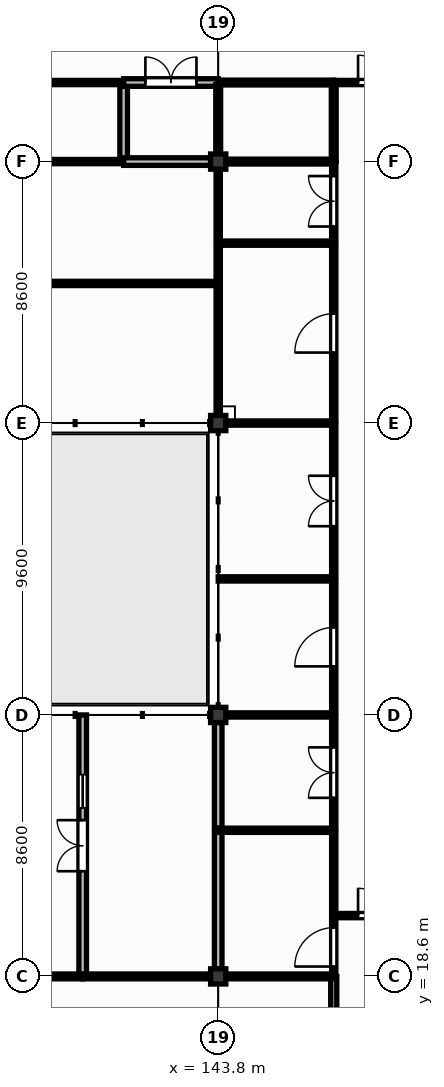
"""IFC4 building model, lengths in metres.
Left out: names, types, materials, properties, quantities, classifications, styles, units other than length and angle.
Written with IfcOpenShell. Run it as: python <this file> out.ifc"""

import sys

from ifc_helpers import new_model, si_unit, direction, frame, frame_2d, origin, origin_2d, place, context, subcontext, project, spatial, rectangle, extrude, element, fill, save


model = new_model("IFC4")
c1 = context("Model", 3, precision=1e-05, world=origin(), true_north=direction((0.0, 1.0)))
c2 = subcontext(c1, "Body", "Model", "MODEL_VIEW")
j1 = project(units=[si_unit("LENGTHUNIT", "METRE"), si_unit("PLANEANGLEUNIT", "RADIAN")], contexts=[c1])
p1 = place(None, origin())
s1 = spatial("IfcSite", under=j1, at=p1, CompositionType="ELEMENT")
p2 = place(p1, origin())
s2 = spatial("IfcBuilding", under=s1, at=p2, CompositionType="ELEMENT")
p3 = place(p2, frame((0.0, 0.0, 4.5)))
s3 = spatial("IfcBuildingStorey", under=s2, at=p3, CompositionType="ELEMENT", Elevation=4.5)
for number, where, z_axis, x_axis in (
    (1, (143.8, 18.6, 0.0), (0.0, 0.0, 1.0), (1.0, 0.0, 0.0)),
    (2, (143.8, 27.2, 0.0), (0.0, 0.0, 1.0), (1.0, 0.0, 0.0)),
    (3, (143.8, 36.8, 0.0), (0.0, 0.0, 1.0), (1.0, 0.0, 0.0)),
    (4, (143.8, 45.4, 0.0), (0.0, 0.0, 1.0), (1.0, 0.0, 0.0)),
):
    element("IfcColumn", number, at=place(p3, frame(where, z_axis=z_axis, x_axis=x_axis)), inside=s3, PredefinedType="COLUMN", context=c2, shape_type="SweptSolid", body=[
        extrude(rectangle(XDim=0.5, YDim=0.5, at=origin_2d()), origin(), (0.0, 0.0, 1.0), 4.22),
    ])
p4 = place(p3, frame((136.6, 41.392, 0.0), z_axis=(0.0, 0.0, 1.0), x_axis=(1.0, 0.0, 0.0)))
e5 = element("IfcWall", 5, at=p4, inside=s3, PredefinedType="PARTITIONING", context=c2, shape_type="SweptSolid", body=[
    extrude(rectangle(XDim=7.2, YDim=0.14, at=frame_2d((3.6, 0.0))), origin(), (0.0, 0.0, 1.0), 4.18),
])
p5 = place(p3, frame((136.85, 45.4, 0.0), z_axis=(0.0, 0.0, 1.0), x_axis=(1.0, 0.0, 0.0)))
e6 = element("IfcWall", 6, at=p5, inside=s3, PredefinedType="PARTITIONING", context=c2, shape_type="SweptSolid", body=[
    extrude(rectangle(XDim=3.84, YDim=0.14, at=frame_2d((1.92, 0.0))), origin(), (0.0, 0.0, 1.0), 3.52),
])
p6 = place(p3, frame((136.6, 48.0, 0.0), z_axis=(0.0, 0.0, 1.0), x_axis=(1.0, 0.0, 0.0)))
e7 = element("IfcWall", 7, at=p6, inside=s3, PredefinedType="PARTITIONING", context=c2, shape_type="SweptSolid", body=[
    extrude(rectangle(XDim=4.09, YDim=0.14, at=frame_2d((2.045, 0.0))), origin(), (0.0, 0.0, 1.0), 4.18),
])
p7 = place(p3, frame((139.343, 18.6, 0.0), z_axis=(0.0, 0.0, 1.0), x_axis=(0.0, 1.0, 0.0)))
e8 = element("IfcWall", 8, at=p7, inside=s3, PredefinedType="SOLIDWALL", context=c2, shape_type="SweptSolid", body=[
    extrude(rectangle(XDim=8.6, YDim=0.25, at=frame_2d((4.3, 0.0))), origin(), (0.0, 0.0, 1.0), 4.18),
])
p8 = place(p7, frame((3.46, 0.0, 0.0)))
e9 = element("IfcOpeningElement", 9, at=p8, cuts=e8, PredefinedType="OPENING", context=c2, shape_type="SweptSolid", body=[
    extrude(rectangle(XDim=1.68, YDim=2.3, at=frame_2d((0.84, 1.15))), frame((0.0, 0.135, 0.0), z_axis=(0.0, -1.0, 0.0), x_axis=(1.0, 0.0, 0.0)), (0.0, 0.0, 1.0), 0.27),
])
p9 = place(p7, frame((5.54, 0.0, 1.1)))
e10 = element("IfcOpeningElement", 10, at=p9, cuts=e8, PredefinedType="OPENING", context=c2, shape_type="SweptSolid", body=[
    extrude(rectangle(XDim=1.1, YDim=1.05, at=frame_2d((0.55, 0.525))), frame((0.0, 0.135, 0.0), z_axis=(0.0, -1.0, 0.0), x_axis=(1.0, 0.0, 0.0)), (0.0, 0.0, 1.0), 0.27),
])
p10 = place(p3, frame((140.69, 45.47, 0.0), z_axis=(0.0, 0.0, 1.0), x_axis=(0.0, 1.0, 0.0)))
e11 = element("IfcWall", 11, at=p10, inside=s3, PredefinedType="SOLIDWALL", context=c2, shape_type="SweptSolid", body=[
    extrude(rectangle(XDim=2.46, YDim=0.25, at=frame_2d((1.23, 0.0))), origin(), (0.0, 0.0, 1.0), 4.18),
])
p11 = place(p3, frame((140.69, 45.4, 0.0), z_axis=(0.0, 0.0, 1.0), x_axis=(1.0, 0.0, 0.0)))
e12 = element("IfcWall", 12, at=p11, inside=s3, PredefinedType="SOLIDWALL", context=c2, shape_type="SweptSolid", body=[
    extrude(rectangle(XDim=2.86, YDim=0.25, at=frame_2d((1.43, 0.0))), origin(), (0.0, 0.0, 1.0), 3.52),
])
p12 = place(p3, frame((140.69, 48.0, 0.0), z_axis=(0.0, 0.0, 1.0), x_axis=(1.0, 0.0, 0.0)))
e13 = element("IfcWall", 13, at=p12, inside=s3, PredefinedType="SOLIDWALL", context=c2, shape_type="SweptSolid", body=[
    extrude(rectangle(XDim=3.11, YDim=0.25, at=frame_2d((1.555, 0.0))), origin(), (0.0, 0.0, 1.0), 4.18),
])
p13 = place(p12, frame((0.715, 0.0, 0.0)))
e14 = element("IfcOpeningElement", 14, at=p13, cuts=e13, PredefinedType="OPENING", context=c2, shape_type="SweptSolid", body=[
    extrude(rectangle(XDim=1.68, YDim=2.3, at=frame_2d((0.84, 1.15))), frame((0.0, 0.135, 0.0), z_axis=(0.0, -1.0, 0.0), x_axis=(1.0, 0.0, 0.0)), (0.0, 0.0, 1.0), 0.27),
])
p14 = place(p3, frame((143.8, 18.85, 0.0), z_axis=(0.0, 0.0, 1.0), x_axis=(0.0, 1.0, 0.0)))
e15 = element("IfcWall", 15, at=p14, inside=s3, PredefinedType="SOLIDWALL", context=c2, shape_type="SweptSolid", body=[
    extrude(rectangle(XDim=4.487, YDim=0.25, at=frame_2d((2.243, 0.0))), origin(), (0.0, 0.0, 1.0), 3.52),
])
p15 = place(p3, frame((143.8, 23.477, 0.0), z_axis=(0.0, 0.0, 1.0), x_axis=(0.0, 1.0, 0.0)))
e16 = element("IfcWall", 16, at=p15, inside=s3, PredefinedType="SOLIDWALL", context=c2, shape_type="SweptSolid", body=[
    extrude(rectangle(XDim=3.473, YDim=0.25, at=frame_2d((1.736, 0.0))), origin(), (0.0, 0.0, 1.0), 3.52),
])
p16 = place(p3, frame((143.8, 23.407, 0.0), z_axis=(0.0, 0.0, 1.0), x_axis=(1.0, 0.0, 0.0)))
e17 = element("IfcWall", 17, at=p16, inside=s3, PredefinedType="PARTITIONING", context=c2, shape_type="SweptSolid", body=[
    extrude(rectangle(XDim=3.8, YDim=0.14, at=frame_2d((1.9, 0.0))), origin(), (0.0, 0.0, 1.0), 4.18),
])
p17 = place(p3, frame((144.05, 27.2, 0.0), z_axis=(0.0, 0.0, 1.0), x_axis=(1.0, 0.0, 0.0)))
e18 = element("IfcWall", 18, at=p17, inside=s3, PredefinedType="PARTITIONING", context=c2, shape_type="SweptSolid", body=[
    extrude(rectangle(XDim=3.55, YDim=0.14, at=frame_2d((1.775, 0.0))), origin(), (0.0, 0.0, 1.0), 3.62),
])
p18 = place(p3, frame((143.8, 31.674, 0.0), z_axis=(0.0, 0.0, 1.0), x_axis=(1.0, 0.0, 0.0)))
e19 = element("IfcWall", 19, at=p18, inside=s3, PredefinedType="PARTITIONING", context=c2, shape_type="SweptSolid", body=[
    extrude(rectangle(XDim=3.8, YDim=0.14, at=frame_2d((1.9, 0.0))), origin(), (0.0, 0.0, 1.0), 4.18),
])
p19 = place(p3, frame((143.8, 37.05, 0.0), z_axis=(0.0, 0.0, 1.0), x_axis=(0.0, 1.0, 0.0)))
e20 = element("IfcWall", 20, at=p19, inside=s3, PredefinedType="PARTITIONING", context=c2, shape_type="SweptSolid", body=[
    extrude(rectangle(XDim=4.272, YDim=0.14, at=frame_2d((2.136, 0.0))), origin(), (0.0, 0.0, 1.0), 3.52),
])
p20 = place(p3, frame((144.05, 36.8, 0.0), z_axis=(0.0, 0.0, 1.0), x_axis=(1.0, 0.0, 0.0)))
e21 = element("IfcWall", 21, at=p20, inside=s3, PredefinedType="PARTITIONING", context=c2, shape_type="SweptSolid", body=[
    extrude(rectangle(XDim=3.55, YDim=0.14, at=frame_2d((1.775, 0.0))), origin(), (0.0, 0.0, 1.0), 3.58),
])
p21 = place(p3, frame((143.8, 41.462, 0.0), z_axis=(0.0, 0.0, 1.0), x_axis=(0.0, 1.0, 0.0)))
e22 = element("IfcWall", 22, at=p21, inside=s3, PredefinedType="PARTITIONING", context=c2, shape_type="SweptSolid", body=[
    extrude(rectangle(XDim=1.185, YDim=0.14, at=frame_2d((0.593, 0.0))), origin(), (0.0, 0.0, 1.0), 3.52),
])
p22 = place(p3, frame((143.8, 42.787, 0.0), z_axis=(0.0, 0.0, 1.0), x_axis=(0.0, 1.0, 0.0)))
e23 = element("IfcWall", 23, at=p22, inside=s3, PredefinedType="PARTITIONING", context=c2, shape_type="SweptSolid", body=[
    extrude(rectangle(XDim=2.363, YDim=0.14, at=frame_2d((1.181, 0.0))), origin(), (0.0, 0.0, 1.0), 3.52),
])
p23 = place(p3, frame((143.8, 42.717, 0.0), z_axis=(0.0, 0.0, 1.0), x_axis=(1.0, 0.0, 0.0)))
e24 = element("IfcWall", 24, at=p23, inside=s3, PredefinedType="PARTITIONING", context=c2, shape_type="SweptSolid", body=[
    extrude(rectangle(XDim=3.8, YDim=0.14, at=frame_2d((1.9, 0.0))), origin(), (0.0, 0.0, 1.0), 4.18),
])
p24 = place(p3, frame((147.6, 18.6, 0.0), z_axis=(0.0, 0.0, 1.0), x_axis=(0.0, 1.0, 0.0)))
e25 = element("IfcWall", 25, at=p24, inside=s3, PredefinedType="PARTITIONING", context=c2, shape_type="SweptSolid", body=[
    extrude(rectangle(XDim=1.93, YDim=0.14, at=frame_2d((0.965, 0.0))), origin(), (0.0, 0.0, 1.0), 4.18),
])
p25 = place(p24, frame((0.325, 0.0, 0.0)))
e26 = element("IfcOpeningElement", 26, at=p25, cuts=e25, PredefinedType="OPENING", context=c2, shape_type="SweptSolid", body=[
    extrude(rectangle(XDim=1.28, YDim=2.2, at=frame_2d((0.64, 1.1))), frame((0.0, 0.08, 0.0), z_axis=(0.0, -1.0, 0.0), x_axis=(1.0, 0.0, 0.0)), (0.0, 0.0, 1.0), 0.16),
])
p26 = place(p3, frame((147.6, 20.67, 0.0), z_axis=(0.0, 0.0, 1.0), x_axis=(0.0, 1.0, 0.0)))
e27 = element("IfcWall", 27, at=p26, inside=s3, PredefinedType="PARTITIONING", context=c2, shape_type="SweptSolid", body=[
    extrude(rectangle(XDim=2.667, YDim=0.14, at=frame_2d((1.333, 0.0))), origin(), (0.0, 0.0, 1.0), 4.18),
])
p27 = place(p3, frame((147.6, 20.6, 0.0), z_axis=(0.0, 0.0, 1.0), x_axis=(1.0, 0.0, 0.0)))
e28 = element("IfcWall", 28, at=p27, inside=s3, PredefinedType="PARTITIONING", context=c2, shape_type="SweptSolid", body=[
    extrude(rectangle(XDim=3.4, YDim=0.14, at=frame_2d((1.7, 0.0))), origin(), (0.0, 0.0, 1.0), 4.18),
])
p28 = place(p27, frame((0.8, 0.0, 0.0)))
e29 = element("IfcOpeningElement", 29, at=p28, cuts=e28, PredefinedType="OPENING", context=c2, shape_type="SweptSolid", body=[
    extrude(rectangle(XDim=1.8, YDim=2.3, at=frame_2d((0.9, 1.15))), frame((0.0, 0.08, 0.0), z_axis=(0.0, -1.0, 0.0), x_axis=(1.0, 0.0, 0.0)), (0.0, 0.0, 1.0), 0.16),
])
p29 = place(p3, frame((147.6, 23.477, 0.0), z_axis=(0.0, 0.0, 1.0), x_axis=(0.0, 1.0, 0.0)))
e30 = element("IfcWall", 30, at=p29, inside=s3, PredefinedType="PARTITIONING", context=c2, shape_type="SweptSolid", body=[
    extrude(rectangle(XDim=3.653, YDim=0.14, at=frame_2d((1.826, 0.0))), origin(), (0.0, 0.0, 1.0), 4.18),
])
p30 = place(p29, frame((0.997, 0.0, 0.0)))
e31 = element("IfcOpeningElement", 31, at=p30, cuts=e30, PredefinedType="OPENING", context=c2, shape_type="SweptSolid", body=[
    extrude(rectangle(XDim=1.66, YDim=2.3, at=frame_2d((0.83, 1.15))), frame((0.0, 0.08, 0.0), z_axis=(0.0, -1.0, 0.0), x_axis=(1.0, 0.0, 0.0)), (0.0, 0.0, 1.0), 0.16),
])
p31 = place(p3, frame((147.6, 27.27, 0.0), z_axis=(0.0, 0.0, 1.0), x_axis=(0.0, 1.0, 0.0)))
e32 = element("IfcWall", 32, at=p31, inside=s3, PredefinedType="PARTITIONING", context=c2, shape_type="SweptSolid", body=[
    extrude(rectangle(XDim=4.334, YDim=0.14, at=frame_2d((2.167, 0.0))), origin(), (0.0, 0.0, 1.0), 4.18),
])
p32 = place(p31, frame((1.527, 0.0, 0.0)))
e33 = element("IfcOpeningElement", 33, at=p32, cuts=e32, PredefinedType="OPENING", context=c2, shape_type="SweptSolid", body=[
    extrude(rectangle(XDim=1.28, YDim=2.2, at=frame_2d((0.64, 1.1))), frame((0.0, 0.08, 0.0), z_axis=(0.0, -1.0, 0.0), x_axis=(1.0, 0.0, 0.0)), (0.0, 0.0, 1.0), 0.16),
])
p33 = place(p3, frame((147.6, 31.744, 0.0), z_axis=(0.0, 0.0, 1.0), x_axis=(0.0, 1.0, 0.0)))
e34 = element("IfcWall", 34, at=p33, inside=s3, PredefinedType="PARTITIONING", context=c2, shape_type="SweptSolid", body=[
    extrude(rectangle(XDim=4.986, YDim=0.14, at=frame_2d((2.493, 0.0))), origin(), (0.0, 0.0, 1.0), 4.18),
])
p34 = place(p33, frame((1.663, 0.0, 0.0)))
e35 = element("IfcOpeningElement", 35, at=p34, cuts=e34, PredefinedType="OPENING", context=c2, shape_type="SweptSolid", body=[
    extrude(rectangle(XDim=1.66, YDim=2.3, at=frame_2d((0.83, 1.15))), frame((0.0, 0.08, 0.0), z_axis=(0.0, -1.0, 0.0), x_axis=(1.0, 0.0, 0.0)), (0.0, 0.0, 1.0), 0.16),
])
p35 = place(p3, frame((147.6, 36.87, 0.0), z_axis=(0.0, 0.0, 1.0), x_axis=(0.0, 1.0, 0.0)))
e36 = element("IfcWall", 36, at=p35, inside=s3, PredefinedType="PARTITIONING", context=c2, shape_type="SweptSolid", body=[
    extrude(rectangle(XDim=5.777, YDim=0.14, at=frame_2d((2.888, 0.0))), origin(), (0.0, 0.0, 1.0), 4.18),
])
p36 = place(p35, frame((2.249, 0.0, 0.0)))
e37 = element("IfcOpeningElement", 37, at=p36, cuts=e36, PredefinedType="OPENING", context=c2, shape_type="SweptSolid", body=[
    extrude(rectangle(XDim=1.28, YDim=2.2, at=frame_2d((0.64, 1.1))), frame((0.0, 0.08, 0.0), z_axis=(0.0, -1.0, 0.0), x_axis=(1.0, 0.0, 0.0)), (0.0, 0.0, 1.0), 0.16),
])
p37 = place(p3, frame((147.6, 42.787, 0.0), z_axis=(0.0, 0.0, 1.0), x_axis=(0.0, 1.0, 0.0)))
e38 = element("IfcWall", 38, at=p37, inside=s3, PredefinedType="PARTITIONING", context=c2, shape_type="SweptSolid", body=[
    extrude(rectangle(XDim=2.613, YDim=0.14, at=frame_2d((1.306, 0.0))), origin(), (0.0, 0.0, 1.0), 4.18),
])
p38 = place(p37, frame((0.477, 0.0, 0.0)))
e39 = element("IfcOpeningElement", 39, at=p38, cuts=e38, PredefinedType="OPENING", context=c2, shape_type="SweptSolid", body=[
    extrude(rectangle(XDim=1.66, YDim=2.3, at=frame_2d((0.83, 1.15))), frame((0.0, 0.08, 0.0), z_axis=(0.0, -1.0, 0.0), x_axis=(1.0, 0.0, 0.0)), (0.0, 0.0, 1.0), 0.16),
])
p39 = place(p3, frame((147.6, 48.0, 0.0), z_axis=(0.0, 0.0, 1.0), x_axis=(1.0, 0.0, 0.0)))
e40 = element("IfcWall", 40, at=p39, inside=s3, PredefinedType="PARTITIONING", context=c2, shape_type="SweptSolid", body=[
    extrude(rectangle(XDim=3.4, YDim=0.14, at=frame_2d((1.7, 0.0))), origin(), (0.0, 0.0, 1.0), 4.18),
])
p40 = place(p39, frame((0.8, 0.0, 0.0)))
e41 = element("IfcOpeningElement", 41, at=p40, cuts=e40, PredefinedType="OPENING", context=c2, shape_type="SweptSolid", body=[
    extrude(rectangle(XDim=1.8, YDim=2.3, at=frame_2d((0.9, 1.15))), frame((0.0, 0.08, 0.0), z_axis=(0.0, -1.0, 0.0), x_axis=(1.0, 0.0, 0.0)), (0.0, 0.0, 1.0), 0.16),
])
p41 = place(p3, frame((147.6, 16.4, 0.0), z_axis=(0.0, 0.0, 1.0), x_axis=(0.0, 1.0, 0.0)))
e42 = element("IfcWall", 42, at=p41, inside=s3, PredefinedType="PARTITIONING", context=c2, shape_type="SweptSolid", body=[
    extrude(rectangle(XDim=2.2, YDim=0.2, at=frame_2d((1.1, 0.0))), origin(), (0.0, 0.0, 1.0), 4.18),
])
p42 = place(p3, frame((147.6, 45.4, 0.0), z_axis=(0.0, 0.0, 1.0), x_axis=(0.0, 1.0, 0.0)))
e43 = element("IfcWall", 43, at=p42, inside=s3, PredefinedType="PARTITIONING", context=c2, shape_type="SweptSolid", body=[
    extrude(rectangle(XDim=2.53, YDim=0.16, at=frame_2d((1.265, 0.0))), origin(), (0.0, 0.0, 1.0), 4.18),
])
p43 = place(p3, frame((143.8, 48.0, 0.0), z_axis=(0.0, 0.0, 1.0), x_axis=(1.0, 0.0, 0.0)))
e44 = element("IfcWall", 44, at=p43, inside=s3, PredefinedType="PARTITIONING", context=c2, shape_type="SweptSolid", body=[
    extrude(rectangle(XDim=3.8, YDim=0.16, at=frame_2d((1.9, 0.0))), origin(), (0.0, 0.0, 1.0), 4.18),
])
p44 = place(p3, frame((136.85, 18.6, 0.0), z_axis=(0.0, 0.0, 1.0), x_axis=(1.0, 0.0, 0.0)))
e45 = element("IfcWall", 45, at=p44, inside=s3, PredefinedType="PARTITIONING", context=c2, shape_type="SweptSolid", body=[
    extrude(rectangle(XDim=2.493, YDim=0.16, at=frame_2d((1.247, 0.0))), origin(), (0.0, 0.0, 1.0), 3.52),
])
p45 = place(p3, frame((139.343, 18.6, 0.0), z_axis=(0.0, 0.0, 1.0), x_axis=(1.0, 0.0, 0.0)))
e46 = element("IfcWall", 46, at=p45, inside=s3, PredefinedType="PARTITIONING", context=c2, shape_type="SweptSolid", body=[
    extrude(rectangle(XDim=4.207, YDim=0.16, at=frame_2d((2.104, 0.0))), origin(), (0.0, 0.0, 1.0), 3.52),
])
p46 = place(p3, frame((143.8, 45.65, 0.0), z_axis=(0.0, 0.0, 1.0), x_axis=(0.0, 1.0, 0.0)))
e47 = element("IfcWall", 47, at=p46, inside=s3, PredefinedType="PARTITIONING", context=c2, shape_type="SweptSolid", body=[
    extrude(rectangle(XDim=2.28, YDim=0.16, at=frame_2d((1.14, 0.0))), origin(), (0.0, 0.0, 1.0), 3.52),
])
p47 = place(p3, frame((144.05, 18.6, 0.0), z_axis=(0.0, 0.0, 1.0), x_axis=(1.0, 0.0, 0.0)))
e48 = element("IfcWall", 48, at=p47, inside=s3, PredefinedType="PARTITIONING", context=c2, shape_type="SweptSolid", body=[
    extrude(rectangle(XDim=3.55, YDim=0.16, at=frame_2d((1.775, 0.0))), origin(), (0.0, 0.0, 1.0), 3.58),
])
p48 = place(p3, frame((147.6, 45.4, 0.0), z_axis=(0.0, 0.0, 1.0), x_axis=(-1.0, 0.0, 0.0)))
e49 = element("IfcWall", 49, at=p48, inside=s3, PredefinedType="PARTITIONING", context=c2, shape_type="SweptSolid", body=[
    extrude(rectangle(XDim=3.55, YDim=0.16, at=frame_2d((1.775, 0.0))), origin(), (0.0, 0.0, 1.0), 3.62),
])
p49 = place(p28, origin())
e50 = element("IfcDoor", 50, at=p49, inside=s3, OperationType="DOUBLE_DOOR_SINGLE_SWING", PredefinedType="DOOR", context=c2, shape_type="SweptSolid", body=[
    extrude(rectangle(XDim=1.8, YDim=2.3, at=frame_2d((0.9, 1.15))), frame((0.0, 0.025, 0.0), z_axis=(0.0, -1.0, 0.0), x_axis=(1.0, 0.0, 0.0)), (0.0, 0.0, 1.0), 0.05),
])
fill(e29, e50)
p50 = place(p40, origin())
e51 = element("IfcDoor", 51, at=p50, inside=s3, OperationType="DOUBLE_DOOR_SINGLE_SWING", PredefinedType="DOOR", context=c2, shape_type="SweptSolid", body=[
    extrude(rectangle(XDim=1.8, YDim=2.3, at=frame_2d((0.9, 1.15))), frame((0.0, 0.025, 0.0), z_axis=(0.0, -1.0, 0.0), x_axis=(1.0, 0.0, 0.0)), (0.0, 0.0, 1.0), 0.05),
])
fill(e41, e51)
p51 = place(p8, origin())
e52 = element("IfcDoor", 52, at=p51, inside=s3, OperationType="DOUBLE_DOOR_SINGLE_SWING", PredefinedType="DOOR", context=c2, shape_type="SweptSolid", body=[
    extrude(rectangle(XDim=1.68, YDim=2.3, at=frame_2d((0.84, 1.15))), frame((0.0, 0.025, 0.0), z_axis=(0.0, -1.0, 0.0), x_axis=(1.0, 0.0, 0.0)), (0.0, 0.0, 1.0), 0.05),
])
fill(e9, e52)
p52 = place(p9, origin())
e53 = element("IfcWindow", 53, at=p52, inside=s3, PartitioningType="SINGLE_PANEL", PredefinedType="WINDOW", context=c2, shape_type="SweptSolid", body=[
    extrude(rectangle(XDim=1.1, YDim=1.05, at=frame_2d((0.55, 0.525))), frame((0.0, 0.03, 0.0), z_axis=(0.0, -1.0, 0.0), x_axis=(1.0, 0.0, 0.0)), (0.0, 0.0, 1.0), 0.06),
])
fill(e10, e53)
p53 = place(p13, origin())
e54 = element("IfcDoor", 54, at=p53, inside=s3, OperationType="DOUBLE_DOOR_SINGLE_SWING", PredefinedType="DOOR", context=c2, shape_type="SweptSolid", body=[
    extrude(rectangle(XDim=1.68, YDim=2.3, at=frame_2d((0.84, 1.15))), frame((0.0, 0.025, 0.0), z_axis=(0.0, -1.0, 0.0), x_axis=(1.0, 0.0, 0.0)), (0.0, 0.0, 1.0), 0.05),
])
fill(e14, e54)
p54 = place(p25, origin())
e55 = element("IfcDoor", 55, at=p54, inside=s3, OperationType="SINGLE_SWING_LEFT", PredefinedType="DOOR", context=c2, shape_type="SweptSolid", body=[
    extrude(rectangle(XDim=1.28, YDim=2.2, at=frame_2d((0.64, 1.1))), frame((0.0, 0.025, 0.0), z_axis=(0.0, -1.0, 0.0), x_axis=(1.0, 0.0, 0.0)), (0.0, 0.0, 1.0), 0.05),
])
fill(e26, e55)
p55 = place(p30, origin())
e56 = element("IfcDoor", 56, at=p55, inside=s3, OperationType="DOUBLE_DOOR_SINGLE_SWING", PredefinedType="DOOR", context=c2, shape_type="SweptSolid", body=[
    extrude(rectangle(XDim=1.66, YDim=2.3, at=frame_2d((0.83, 1.15))), frame((0.0, 0.025, 0.0), z_axis=(0.0, -1.0, 0.0), x_axis=(1.0, 0.0, 0.0)), (0.0, 0.0, 1.0), 0.05),
])
fill(e31, e56)
p56 = place(p32, origin())
e57 = element("IfcDoor", 57, at=p56, inside=s3, OperationType="SINGLE_SWING_LEFT", PredefinedType="DOOR", context=c2, shape_type="SweptSolid", body=[
    extrude(rectangle(XDim=1.28, YDim=2.2, at=frame_2d((0.64, 1.1))), frame((0.0, 0.025, 0.0), z_axis=(0.0, -1.0, 0.0), x_axis=(1.0, 0.0, 0.0)), (0.0, 0.0, 1.0), 0.05),
])
fill(e33, e57)
p57 = place(p34, origin())
e58 = element("IfcDoor", 58, at=p57, inside=s3, OperationType="DOUBLE_DOOR_SINGLE_SWING", PredefinedType="DOOR", context=c2, shape_type="SweptSolid", body=[
    extrude(rectangle(XDim=1.66, YDim=2.3, at=frame_2d((0.83, 1.15))), frame((0.0, 0.025, 0.0), z_axis=(0.0, -1.0, 0.0), x_axis=(1.0, 0.0, 0.0)), (0.0, 0.0, 1.0), 0.05),
])
fill(e35, e58)
p58 = place(p36, origin())
e59 = element("IfcDoor", 59, at=p58, inside=s3, OperationType="SINGLE_SWING_LEFT", PredefinedType="DOOR", context=c2, shape_type="SweptSolid", body=[
    extrude(rectangle(XDim=1.28, YDim=2.2, at=frame_2d((0.64, 1.1))), frame((0.0, 0.025, 0.0), z_axis=(0.0, -1.0, 0.0), x_axis=(1.0, 0.0, 0.0)), (0.0, 0.0, 1.0), 0.05),
])
fill(e37, e59)
p59 = place(p38, origin())
e60 = element("IfcDoor", 60, at=p59, inside=s3, OperationType="DOUBLE_DOOR_SINGLE_SWING", PredefinedType="DOOR", context=c2, shape_type="SweptSolid", body=[
    extrude(rectangle(XDim=1.66, YDim=2.3, at=frame_2d((0.83, 1.15))), frame((0.0, 0.025, 0.0), z_axis=(0.0, -1.0, 0.0), x_axis=(1.0, 0.0, 0.0)), (0.0, 0.0, 1.0), 0.05),
])
fill(e39, e60)
save(model, sys.argv[1])
